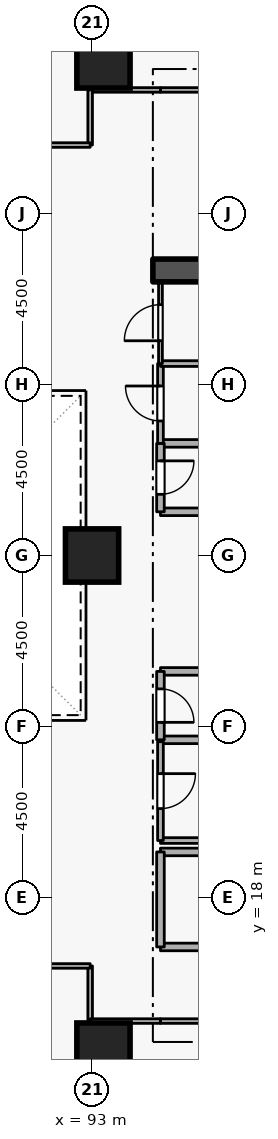
"""IFC4 building model, lengths in metres.
Left out: names, types, materials, properties, quantities, classifications, styles, units other than length and angle.
Written with IfcOpenShell. Run it as: python <this file> out.ifc"""

import sys

from ifc_helpers import new_model, si_unit, direction, frame, frame_2d, origin, origin_2d, place, context, subcontext, project, spatial, rectangle, extrude, element, fill, save


model = new_model("IFC4")
c1 = context("Model", 3, precision=1e-05, world=origin(), true_north=direction((0.0, 1.0)))
c2 = subcontext(c1, "Body", "Model", "MODEL_VIEW")
j1 = project(units=[si_unit("LENGTHUNIT", "METRE"), si_unit("PLANEANGLEUNIT", "RADIAN")], contexts=[c1])
p1 = place(None, origin())
s1 = spatial("IfcSite", under=j1, at=p1, CompositionType="ELEMENT")
p2 = place(p1, origin())
s2 = spatial("IfcBuilding", under=s1, at=p2, CompositionType="ELEMENT")
p3 = place(p2, frame((0.0, 0.0, 49.5)))
s3 = spatial("IfcBuildingStorey", under=s2, at=p3, CompositionType="ELEMENT", Elevation=49.5)
p4 = place(p3, frame((94.6, 34.5, 0.0), z_axis=(0.0, 0.0, 1.0), x_axis=(1.0, 0.0, 0.0)))
e1 = element("IfcWall", 1, at=p4, inside=s3, PredefinedType="SHEAR", context=c2, shape_type="SweptSolid", body=[
    extrude(rectangle(XDim=5.7, YDim=0.6, at=frame_2d((2.85, 0.0))), origin(), (0.0, 0.0, 1.0), 4.2),
])
for number, where, z_axis, x_axis in (
    (2, (93.3, 14.0, 0.0), (0.0, 0.0, 1.0), (1.0, 0.0, 0.0)),
    (3, (93.3, 40.0, 0.0), (0.0, 0.0, 1.0), (1.0, 0.0, 0.0)),
    (4, (93.0, 27.0, 0.0), (0.0, 0.0, 1.0), (1.0, 0.0, 0.0)),
):
    element("IfcColumn", number, at=place(p3, frame(where, z_axis=z_axis, x_axis=x_axis)), inside=s3, PredefinedType="COLUMN", context=c2, shape_type="SweptSolid", body=[
        extrude(rectangle(XDim=1.4, YDim=1.4, at=origin_2d()), origin(), (0.0, 0.0, 1.0), 4.2),
    ])
p5 = place(p3, frame((94.8, 16.7, 0.0), z_axis=(0.0, 0.0, 1.0), x_axis=(1.0, 0.0, 0.0)))
e5 = element("IfcWall", 5, at=p5, inside=s3, PredefinedType="STANDARD", context=c2, shape_type="SweptSolid", body=[
    extrude(rectangle(XDim=5.7, YDim=0.2, at=frame_2d((2.85, 0.0))), origin(), (0.0, 0.0, 1.0), 3.94),
])
p6 = place(p5, frame((2.275, 0.0, 0.0)))
e6 = element("IfcOpeningElement", 6, at=p6, cuts=e5, PredefinedType="OPENING", context=c2, shape_type="SweptSolid", body=[
    extrude(rectangle(XDim=1.15, YDim=2.1, at=frame_2d((0.575, 1.05))), frame((0.0, 0.11, 0.0), z_axis=(0.0, -1.0, 0.0), x_axis=(1.0, 0.0, 0.0)), (0.0, 0.0, 1.0), 0.22),
])
p7 = place(p3, frame((97.1, 19.2, 0.0), z_axis=(0.0, 0.0, 1.0), x_axis=(-1.0, 0.0, 0.0)))
e7 = element("IfcWall", 7, at=p7, inside=s3, PredefinedType="STANDARD", context=c2, shape_type="SweptSolid", body=[
    extrude(rectangle(XDim=2.3, YDim=0.2, at=frame_2d((1.15, 0.0))), origin(), (0.0, 0.0, 1.0), 3.145),
])
p8 = place(p3, frame((94.8, 19.2, 0.0), z_axis=(0.0, 0.0, 1.0), x_axis=(0.0, -1.0, 0.0)))
e8 = element("IfcWall", 8, at=p8, inside=s3, PredefinedType="STANDARD", context=c2, shape_type="SweptSolid", body=[
    extrude(rectangle(XDim=2.5, YDim=0.2, at=frame_2d((1.25, 0.0))), origin(), (0.0, 0.0, 1.0), 3.94),
])
for number, where, z_axis, x_axis in (
    (9, (94.8, 28.15, 0.0), (0.0, 0.0, 1.0), (1.0, 0.0, 0.0)),
    (10, (96.85, 29.95, 0.0), (0.0, 0.0, 1.0), (-1.0, 0.0, 0.0)),
):
    element("IfcWall", number, at=place(p3, frame(where, z_axis=z_axis, x_axis=x_axis)), inside=s3, PredefinedType="STANDARD", context=c2, shape_type="SweptSolid", body=[
        extrude(rectangle(XDim=2.05, YDim=0.2, at=frame_2d((1.025, 0.0))), origin(), (0.0, 0.0, 1.0), 3.94),
    ])
p9 = place(p3, frame((94.8, 29.95, 0.0), z_axis=(0.0, 0.0, 1.0), x_axis=(0.0, -1.0, 0.0)))
e11 = element("IfcWall", 11, at=p9, inside=s3, PredefinedType="STANDARD", context=c2, shape_type="SweptSolid", body=[
    extrude(rectangle(XDim=1.8, YDim=0.2, at=frame_2d((0.9, 0.0))), origin(), (0.0, 0.0, 1.0), 3.94),
])
p10 = place(p9, frame((0.46, 0.0, 0.0)))
e12 = element("IfcOpeningElement", 12, at=p10, cuts=e11, PredefinedType="OPENING", context=c2, shape_type="SweptSolid", body=[
    extrude(rectangle(XDim=0.88, YDim=2.04, at=frame_2d((0.44, 1.02))), frame((0.0, 0.11, 0.0), z_axis=(0.0, -1.0, 0.0), x_axis=(1.0, 0.0, 0.0)), (0.0, 0.0, 1.0), 0.22),
])
for number, where, z_axis, x_axis in (
    (13, (94.8, 22.15, 0.0), (0.0, 0.0, 1.0), (1.0, 0.0, 0.0)),
    (14, (96.85, 23.95, 0.0), (0.0, 0.0, 1.0), (-1.0, 0.0, 0.0)),
):
    element("IfcWall", number, at=place(p3, frame(where, z_axis=z_axis, x_axis=x_axis)), inside=s3, PredefinedType="STANDARD", context=c2, shape_type="SweptSolid", body=[
        extrude(rectangle(XDim=2.05, YDim=0.2, at=frame_2d((1.025, 0.0))), origin(), (0.0, 0.0, 1.0), 3.94),
    ])
p11 = place(p3, frame((94.8, 23.95, 0.0), z_axis=(0.0, 0.0, 1.0), x_axis=(0.0, -1.0, 0.0)))
e15 = element("IfcWall", 15, at=p11, inside=s3, PredefinedType="STANDARD", context=c2, shape_type="SweptSolid", body=[
    extrude(rectangle(XDim=1.8, YDim=0.2, at=frame_2d((0.9, 0.0))), origin(), (0.0, 0.0, 1.0), 3.94),
])
p12 = place(p11, frame((0.46, 0.0, 0.0)))
e16 = element("IfcOpeningElement", 16, at=p12, cuts=e15, PredefinedType="OPENING", context=c2, shape_type="SweptSolid", body=[
    extrude(rectangle(XDim=0.88, YDim=2.04, at=frame_2d((0.44, 1.02))), frame((0.0, 0.11, 0.0), z_axis=(0.0, -1.0, 0.0), x_axis=(1.0, 0.0, 0.0)), (0.0, 0.0, 1.0), 0.22),
])
p13 = place(p3, frame((94.8, 19.5, 0.0), z_axis=(0.0, 0.0, 1.0), x_axis=(1.0, 0.0, 0.0)))
e17 = element("IfcWall", 17, at=p13, inside=s3, PredefinedType="PARTITIONING", context=c2, shape_type="SweptSolid", body=[
    extrude(rectangle(XDim=2.05, YDim=0.15, at=frame_2d((1.025, 0.0))), origin(), (0.0, 0.0, 1.0), 3.145),
])
p14 = place(p3, frame((94.8, 22.1, 0.0), z_axis=(0.0, 0.0, 1.0), x_axis=(0.0, -1.0, 0.0)))
e18 = element("IfcWall", 18, at=p14, inside=s3, PredefinedType="PARTITIONING", context=c2, shape_type="SweptSolid", body=[
    extrude(rectangle(XDim=2.6, YDim=0.15, at=frame_2d((1.3, 0.0))), origin(), (0.0, 0.0, 1.0), 3.94),
])
p15 = place(p14, frame((0.84, 0.0, 0.0)))
e19 = element("IfcOpeningElement", 19, at=p15, cuts=e18, PredefinedType="OPENING", context=c2, shape_type="SweptSolid", body=[
    extrude(rectangle(XDim=0.92, YDim=2.08, at=frame_2d((0.46, 1.04))), frame((0.0, 0.085, 0.0), z_axis=(0.0, -1.0, 0.0), x_axis=(1.0, 0.0, 0.0)), (0.0, 0.0, 1.0), 0.17),
])
p16 = place(p3, frame((94.8, 29.95, 0.0), z_axis=(0.0, 0.0, 1.0), x_axis=(0.0, 1.0, 0.0)))
e20 = element("IfcWall", 20, at=p16, inside=s3, PredefinedType="PARTITIONING", context=c2, shape_type="SweptSolid", body=[
    extrude(rectangle(XDim=2.1, YDim=0.15, at=frame_2d((1.05, 0.0))), origin(), (0.0, 0.0, 1.0), 3.94),
])
p17 = place(p16, frame((0.59, 0.0, 0.0)))
e21 = element("IfcOpeningElement", 21, at=p17, cuts=e20, PredefinedType="OPENING", context=c2, shape_type="SweptSolid", body=[
    extrude(rectangle(XDim=0.92, YDim=2.08, at=frame_2d((0.46, 1.04))), frame((0.0, 0.085, 0.0), z_axis=(0.0, -1.0, 0.0), x_axis=(1.0, 0.0, 0.0)), (0.0, 0.0, 1.0), 0.17),
])
p18 = place(p3, frame((94.8, 32.05, 0.0), z_axis=(0.0, 0.0, 1.0), x_axis=(1.0, 0.0, 0.0)))
e22 = element("IfcWall", 22, at=p18, inside=s3, PredefinedType="PARTITIONING", context=c2, shape_type="SweptSolid", body=[
    extrude(rectangle(XDim=2.05, YDim=0.15, at=frame_2d((1.025, 0.0))), origin(), (0.0, 0.0, 1.0), 3.94),
])
p19 = place(p3, frame((94.8, 32.05, 0.0), z_axis=(0.0, 0.0, 1.0), x_axis=(0.0, 1.0, 0.0)))
e23 = element("IfcWall", 23, at=p19, inside=s3, PredefinedType="PARTITIONING", context=c2, shape_type="SweptSolid", body=[
    extrude(rectangle(XDim=2.15, YDim=0.1, at=frame_2d((1.075, 0.0))), origin(), (0.0, 0.0, 1.0), 3.94),
])
p20 = place(p19, frame((0.6, 0.0, 0.0)))
e24 = element("IfcOpeningElement", 24, at=p20, cuts=e23, PredefinedType="OPENING", context=c2, shape_type="SweptSolid", body=[
    extrude(rectangle(XDim=0.95, YDim=2.1, at=frame_2d((0.475, 1.05))), frame((0.0, 0.06, 0.0), z_axis=(0.0, -1.0, 0.0), x_axis=(1.0, 0.0, 0.0)), (0.0, 0.0, 1.0), 0.12),
])
p21 = place(p3, frame((92.95, 16.2, 0.0), z_axis=(0.0, 0.0, 1.0), x_axis=(0.0, -1.0, 0.0)))
e25 = element("IfcWall", 25, at=p21, inside=s3, PredefinedType="PARTITIONING", context=c2, shape_type="SweptSolid", body=[
    extrude(rectangle(XDim=1.45, YDim=0.12, at=frame_2d((0.725, 0.0))), origin(), (0.0, 0.0, 1.0), 3.94),
])
p22 = place(p3, frame((92.95, 14.75, 0.0), z_axis=(0.0, 0.0, 1.0), x_axis=(1.0, 0.0, 0.0)))
e26 = element("IfcWall", 26, at=p22, inside=s3, PredefinedType="PARTITIONING", context=c2, shape_type="SweptSolid", body=[
    extrude(rectangle(XDim=1.85, YDim=0.12, at=frame_2d((0.925, 0.0))), origin(), (0.0, 0.0, 1.0), 3.94),
])
p23 = place(p3, frame((94.8, 14.75, 0.0), z_axis=(0.0, 0.0, 1.0), x_axis=(1.0, 0.0, 0.0)))
e27 = element("IfcWall", 27, at=p23, inside=s3, PredefinedType="PARTITIONING", context=c2, shape_type="SweptSolid", body=[
    extrude(rectangle(XDim=9.35, YDim=0.12, at=frame_2d((4.675, 0.0))), origin(), (0.0, 0.0, 1.0), 3.94),
])
p24 = place(p23, frame((4.15, 0.0, 0.0)))
e28 = element("IfcOpeningElement", 28, at=p24, cuts=e27, PredefinedType="OPENING", context=c2, shape_type="SweptSolid", body=[
    extrude(rectangle(XDim=1.05, YDim=2.1, at=frame_2d((0.525, 1.05))), frame((0.0, 0.07, 0.0), z_axis=(0.0, -1.0, 0.0), x_axis=(1.0, 0.0, 0.0)), (0.0, 0.0, 1.0), 0.14),
])
p25 = place(p3, frame((88.5, 16.2, 0.0), z_axis=(0.0, 0.0, 1.0), x_axis=(1.0, 0.0, 0.0)))
e29 = element("IfcWall", 29, at=p25, inside=s3, PredefinedType="PARTITIONING", context=c2, shape_type="SweptSolid", body=[
    extrude(rectangle(XDim=4.45, YDim=0.12, at=frame_2d((2.225, 0.0))), origin(), (0.0, 0.0, 1.0), 3.94),
])
p26 = place(p3, frame((97.95, 39.25, 0.0), z_axis=(0.0, 0.0, 1.0), x_axis=(-1.0, 0.0, 0.0)))
e30 = element("IfcWall", 30, at=p26, inside=s3, PredefinedType="PARTITIONING", context=c2, shape_type="SweptSolid", body=[
    extrude(rectangle(XDim=3.15, YDim=0.12, at=frame_2d((1.575, 0.0))), origin(), (0.0, 0.0, 1.0), 3.94),
])
p27 = place(p3, frame((94.8, 39.25, 0.0), z_axis=(0.0, 0.0, 1.0), x_axis=(-1.0, 0.0, 0.0)))
e31 = element("IfcWall", 31, at=p27, inside=s3, PredefinedType="PARTITIONING", context=c2, shape_type="SweptSolid", body=[
    extrude(rectangle(XDim=1.85, YDim=0.12, at=frame_2d((0.925, 0.0))), origin(), (0.0, 0.0, 1.0), 3.94),
])
p28 = place(p3, frame((92.95, 39.25, 0.0), z_axis=(0.0, 0.0, 1.0), x_axis=(0.0, -1.0, 0.0)))
e32 = element("IfcWall", 32, at=p28, inside=s3, PredefinedType="PARTITIONING", context=c2, shape_type="SweptSolid", body=[
    extrude(rectangle(XDim=1.45, YDim=0.12, at=frame_2d((0.725, 0.0))), origin(), (0.0, 0.0, 1.0), 3.94),
])
p29 = place(p3, frame((92.95, 37.8, 0.0), z_axis=(0.0, 0.0, 1.0), x_axis=(-1.0, 0.0, 0.0)))
e33 = element("IfcWall", 33, at=p29, inside=s3, PredefinedType="PARTITIONING", context=c2, shape_type="SweptSolid", body=[
    extrude(rectangle(XDim=4.45, YDim=0.12, at=frame_2d((2.225, 0.0))), origin(), (0.0, 0.0, 1.0), 3.94),
])
p30 = place(p29, frame((1.7, 0.0, 0.0)))
e34 = element("IfcOpeningElement", 34, at=p30, cuts=e33, PredefinedType="OPENING", context=c2, shape_type="SweptSolid", body=[
    extrude(rectangle(XDim=1.05, YDim=2.1, at=frame_2d((0.525, 1.05))), frame((0.0, 0.07, 0.0), z_axis=(0.0, -1.0, 0.0), x_axis=(1.0, 0.0, 0.0)), (0.0, 0.0, 1.0), 0.14),
])
p31 = place(p10, origin())
e35 = element("IfcDoor", 35, at=p31, inside=s3, OperationType="SINGLE_SWING_LEFT", PredefinedType="DOOR", context=c2, shape_type="SweptSolid", body=[
    extrude(rectangle(XDim=0.88, YDim=2.04, at=frame_2d((0.44, 1.02))), frame((0.0, 0.025, 0.0), z_axis=(0.0, -1.0, 0.0), x_axis=(1.0, 0.0, 0.0)), (0.0, 0.0, 1.0), 0.05),
])
fill(e12, e35)
p32 = place(p12, origin())
e36 = element("IfcDoor", 36, at=p32, inside=s3, OperationType="SINGLE_SWING_RIGHT", PredefinedType="DOOR", context=c2, shape_type="SweptSolid", body=[
    extrude(rectangle(XDim=0.88, YDim=2.04, at=frame_2d((0.44, 1.02))), frame((0.0, 0.025, 0.0), z_axis=(0.0, -1.0, 0.0), x_axis=(1.0, 0.0, 0.0)), (0.0, 0.0, 1.0), 0.05),
])
fill(e16, e36)
p33 = place(p15, origin())
e37 = element("IfcDoor", 37, at=p33, inside=s3, OperationType="SINGLE_SWING_LEFT", PredefinedType="DOOR", context=c2, shape_type="SweptSolid", body=[
    extrude(rectangle(XDim=0.92, YDim=2.08, at=frame_2d((0.46, 1.04))), frame((0.0, 0.025, 0.0), z_axis=(0.0, -1.0, 0.0), x_axis=(1.0, 0.0, 0.0)), (0.0, 0.0, 1.0), 0.05),
])
fill(e19, e37)
p34 = place(p17, origin())
e38 = element("IfcDoor", 38, at=p34, inside=s3, OperationType="SINGLE_SWING_RIGHT", PredefinedType="DOOR", context=c2, shape_type="SweptSolid", body=[
    extrude(rectangle(XDim=0.92, YDim=2.08, at=frame_2d((0.46, 1.04))), frame((0.0, 0.025, 0.0), z_axis=(0.0, -1.0, 0.0), x_axis=(1.0, 0.0, 0.0)), (0.0, 0.0, 1.0), 0.05),
])
fill(e21, e38)
p35 = place(p20, origin())
e39 = element("IfcDoor", 39, at=p35, inside=s3, OperationType="SINGLE_SWING_LEFT", PredefinedType="DOOR", context=c2, shape_type="SweptSolid", body=[
    extrude(rectangle(XDim=0.95, YDim=2.1, at=frame_2d((0.475, 1.05))), frame((0.0, 0.025, 0.0), z_axis=(0.0, -1.0, 0.0), x_axis=(1.0, 0.0, 0.0)), (0.0, 0.0, 1.0), 0.05),
])
fill(e24, e39)
save(model, sys.argv[1])
